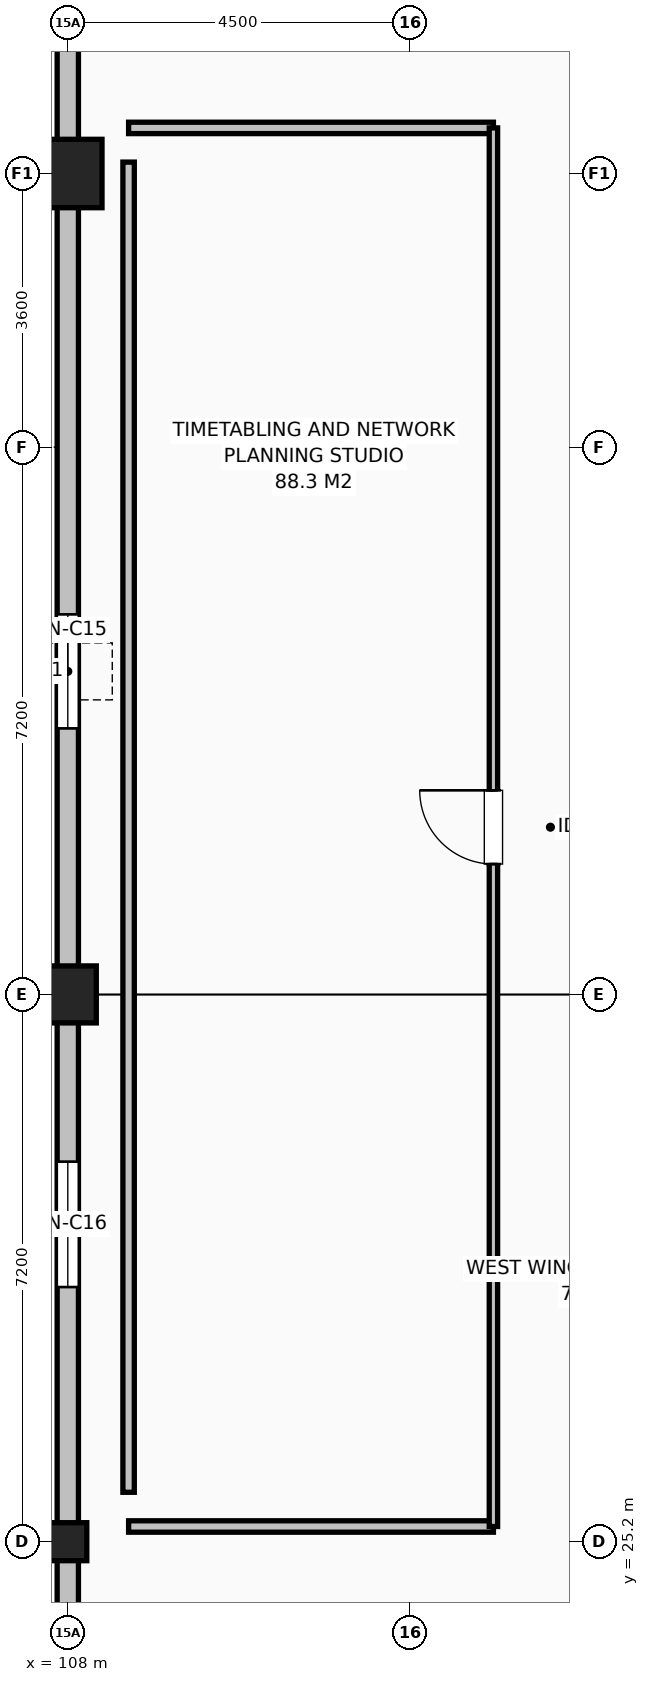
"""IFC4 building model, lengths in metres.
Left out: names, types, materials, properties, quantities, classifications, styles, units other than length and angle.
Written with IfcOpenShell. Run it as: python <this file> out.ifc"""

import sys

from ifc_helpers import new_model, si_unit, direction, frame, frame_2d, origin, origin_2d, place, context, subcontext, project, spatial, rectangle, circle, extrude, element, fill, save


model = new_model("IFC4")
c1 = context("Model", 3, precision=1e-05, world=origin(), true_north=direction((0.0, 1.0)))
c2 = subcontext(c1, "Body", "Model", "MODEL_VIEW")
j1 = project(units=[si_unit("LENGTHUNIT", "METRE"), si_unit("PLANEANGLEUNIT", "RADIAN")], contexts=[c1])
p1 = place(None, origin())
s1 = spatial("IfcSite", under=j1, at=p1, CompositionType="ELEMENT")
p2 = place(p1, origin())
s2 = spatial("IfcBuilding", under=s1, at=p2, CompositionType="ELEMENT")
p3 = place(p2, frame((0.0, 0.0, 9.0)))
s3 = spatial("IfcBuildingStorey", under=s2, at=p3, CompositionType="ELEMENT", Elevation=9.0)
p4 = place(p3, frame((108.0, 25.2, 0.0), z_axis=(0.0, 0.0, 1.0), x_axis=(1.0, 0.0, 0.0)))
e1 = element("IfcColumn", 1, at=p4, inside=s3, PredefinedType="COLUMN", context=c2, shape_type="SweptSolid", body=[
    extrude(circle(Radius=0.25, at=origin_2d()), origin(), (0.0, 0.0, 1.0), 4.2),
])
p5 = place(p3, frame((108.0, 32.4, 0.0), z_axis=(0.0, 0.0, 1.0), x_axis=(1.0, 0.0, 0.0)))
e2 = element("IfcColumn", 2, at=p5, inside=s3, PredefinedType="COLUMN", context=c2, shape_type="SweptSolid", body=[
    extrude(circle(Radius=0.375, at=origin_2d()), origin(), (0.0, 0.0, 1.0), 4.2),
])
p6 = place(p3, frame((108.0, 43.2, 0.0), z_axis=(0.0, 0.0, 1.0), x_axis=(1.0, 0.0, 0.0)))
e3 = element("IfcColumn", 3, at=p6, inside=s3, PredefinedType="COLUMN", context=c2, shape_type="SweptSolid", body=[
    extrude(circle(Radius=0.45, at=origin_2d()), origin(), (0.0, 0.0, 1.0), 4.2),
])
p7 = place(p3, frame((108.0, 54.0, 0.0), z_axis=(0.0, 0.0, 1.0), x_axis=(0.0, -1.0, 0.0)))
e4 = element("IfcWall", 4, at=p7, inside=s3, PredefinedType="SOLIDWALL", context=c2, shape_type="SweptSolid", body=[
    extrude(rectangle(XDim=54.0, YDim=0.28, at=frame_2d((27.0, 0.0))), origin(), (0.0, 0.0, 1.0), 3.4),
])
p8 = place(p7, frame((2.2, 0.0, 0.78)))
e5 = element("IfcOpeningElement", 5, at=p8, cuts=e4, PredefinedType="OPENING", context=c2, shape_type="SweptSolid", body=[
    extrude(rectangle(XDim=1.25, YDim=1.7, at=frame_2d((0.625, 0.85))), frame((0.0, 0.15, 0.0), z_axis=(0.0, -1.0, 0.0), x_axis=(1.0, 0.0, 0.0)), (0.0, 0.0, 1.0), 0.3),
])
p9 = place(p7, frame((16.6, 0.0, 0.78)))
e6 = element("IfcOpeningElement", 6, at=p9, cuts=e4, PredefinedType="OPENING", context=c2, shape_type="SweptSolid", body=[
    extrude(rectangle(XDim=1.5, YDim=1.75, at=frame_2d((0.75, 0.875))), frame((0.0, 0.15, 0.0), z_axis=(0.0, -1.0, 0.0), x_axis=(1.0, 0.0, 0.0)), (0.0, 0.0, 1.0), 0.3),
])
p10 = place(p7, frame((23.8, 0.0, 0.78)))
e7 = element("IfcOpeningElement", 7, at=p10, cuts=e4, PredefinedType="OPENING", context=c2, shape_type="SweptSolid", body=[
    extrude(rectangle(XDim=1.65, YDim=1.8, at=frame_2d((0.825, 0.9))), frame((0.0, 0.15, 0.0), z_axis=(0.0, -1.0, 0.0), x_axis=(1.0, 0.0, 0.0)), (0.0, 0.0, 1.0), 0.3),
])
p11 = place(p7, frame((31.0, 0.0, 0.78)))
e8 = element("IfcOpeningElement", 8, at=p11, cuts=e4, PredefinedType="OPENING", context=c2, shape_type="SweptSolid", body=[
    extrude(rectangle(XDim=1.95, YDim=1.8, at=frame_2d((0.975, 0.9))), frame((0.0, 0.15, 0.0), z_axis=(0.0, -1.0, 0.0), x_axis=(1.0, 0.0, 0.0)), (0.0, 0.0, 1.0), 0.3),
])
p12 = place(p7, frame((38.2, 0.0, 0.78)))
e9 = element("IfcOpeningElement", 9, at=p12, cuts=e4, PredefinedType="OPENING", context=c2, shape_type="SweptSolid", body=[
    extrude(rectangle(XDim=2.1, YDim=1.8, at=frame_2d((1.05, 0.9))), frame((0.0, 0.15, 0.0), z_axis=(0.0, -1.0, 0.0), x_axis=(1.0, 0.0, 0.0)), (0.0, 0.0, 1.0), 0.3),
])
p13 = place(p3, frame((108.8, 43.8, 0.0), z_axis=(0.0, 0.0, 1.0), x_axis=(1.0, 0.0, 0.0)))
e10 = element("IfcWall", 10, at=p13, inside=s3, PredefinedType="PARTITIONING", context=c2, shape_type="SweptSolid", body=[
    extrude(rectangle(XDim=4.8, YDim=0.15, at=frame_2d((2.4, 0.0))), origin(), (0.0, 0.0, 1.0), 3.6),
])
p14 = place(p3, frame((113.6, 25.4, 0.0), z_axis=(0.0, 0.0, 1.0), x_axis=(-1.0, 0.0, 0.0)))
e11 = element("IfcWall", 11, at=p14, inside=s3, PredefinedType="PARTITIONING", context=c2, shape_type="SweptSolid", body=[
    extrude(rectangle(XDim=4.8, YDim=0.15, at=frame_2d((2.4, 0.0))), origin(), (0.0, 0.0, 1.0), 2.952),
])
p15 = place(p3, frame((108.8, 43.35, 0.0), z_axis=(0.0, 0.0, 1.0), x_axis=(0.0, -1.0, 0.0)))
e12 = element("IfcWall", 12, at=p15, inside=s3, PredefinedType="PARTITIONING", context=c2, shape_type="SweptSolid", body=[
    extrude(rectangle(XDim=17.5, YDim=0.15, at=frame_2d((8.75, 0.0))), origin(), (0.0, 0.0, 1.0), 3.482),
])
p16 = place(p3, frame((113.6, 25.4, 0.0), z_axis=(0.0, 0.0, 1.0), x_axis=(0.0, 1.0, 0.0)))
e13 = element("IfcWall", 13, at=p16, inside=s3, PredefinedType="PARTITIONING", context=c2, shape_type="SweptSolid", body=[
    extrude(rectangle(XDim=18.4, YDim=0.11, at=frame_2d((9.2, 0.0))), origin(), (0.0, 0.0, 1.0), 2.952),
])
p17 = place(p16, frame((8.715, 0.0, 0.0)))
e14 = element("IfcOpeningElement", 14, at=p17, cuts=e13, PredefinedType="OPENING", context=c2, shape_type="SweptSolid", body=[
    extrude(rectangle(XDim=0.97, YDim=2.15, at=frame_2d((0.485, 1.075))), frame((0.0, 0.065, 0.0), z_axis=(0.0, -1.0, 0.0), x_axis=(1.0, 0.0, 0.0)), (0.0, 0.0, 1.0), 0.13),
])
p18 = place(p9, origin())
e15 = element("IfcWindow", 15, at=p18, inside=s3, PartitioningType="SINGLE_PANEL", PredefinedType="WINDOW", context=c2, shape_type="SweptSolid", body=[
    extrude(rectangle(XDim=1.5, YDim=1.75, at=frame_2d((0.75, 0.875))), frame((0.0, 0.03, 0.0), z_axis=(0.0, -1.0, 0.0), x_axis=(1.0, 0.0, 0.0)), (0.0, 0.0, 1.0), 0.06),
])
fill(e6, e15)
p19 = place(p10, origin())
e16 = element("IfcWindow", 16, at=p19, inside=s3, PartitioningType="SINGLE_PANEL", PredefinedType="WINDOW", context=c2, shape_type="SweptSolid", body=[
    extrude(rectangle(XDim=1.65, YDim=1.8, at=frame_2d((0.825, 0.9))), frame((0.0, 0.03, 0.0), z_axis=(0.0, -1.0, 0.0), x_axis=(1.0, 0.0, 0.0)), (0.0, 0.0, 1.0), 0.06),
])
fill(e7, e16)
p20 = place(p17, origin())
e17 = element("IfcDoor", 17, at=p20, inside=s3, OperationType="SINGLE_SWING_RIGHT", PredefinedType="DOOR", context=c2, shape_type="SweptSolid", body=[
    extrude(rectangle(XDim=0.97, YDim=2.15, at=frame_2d((0.485, 1.075))), frame((0.0, 0.025, 0.0), z_axis=(0.0, -1.0, 0.0), x_axis=(1.0, 0.0, 0.0)), (0.0, 0.0, 1.0), 0.05),
])
fill(e14, e17)
save(model, sys.argv[1])
